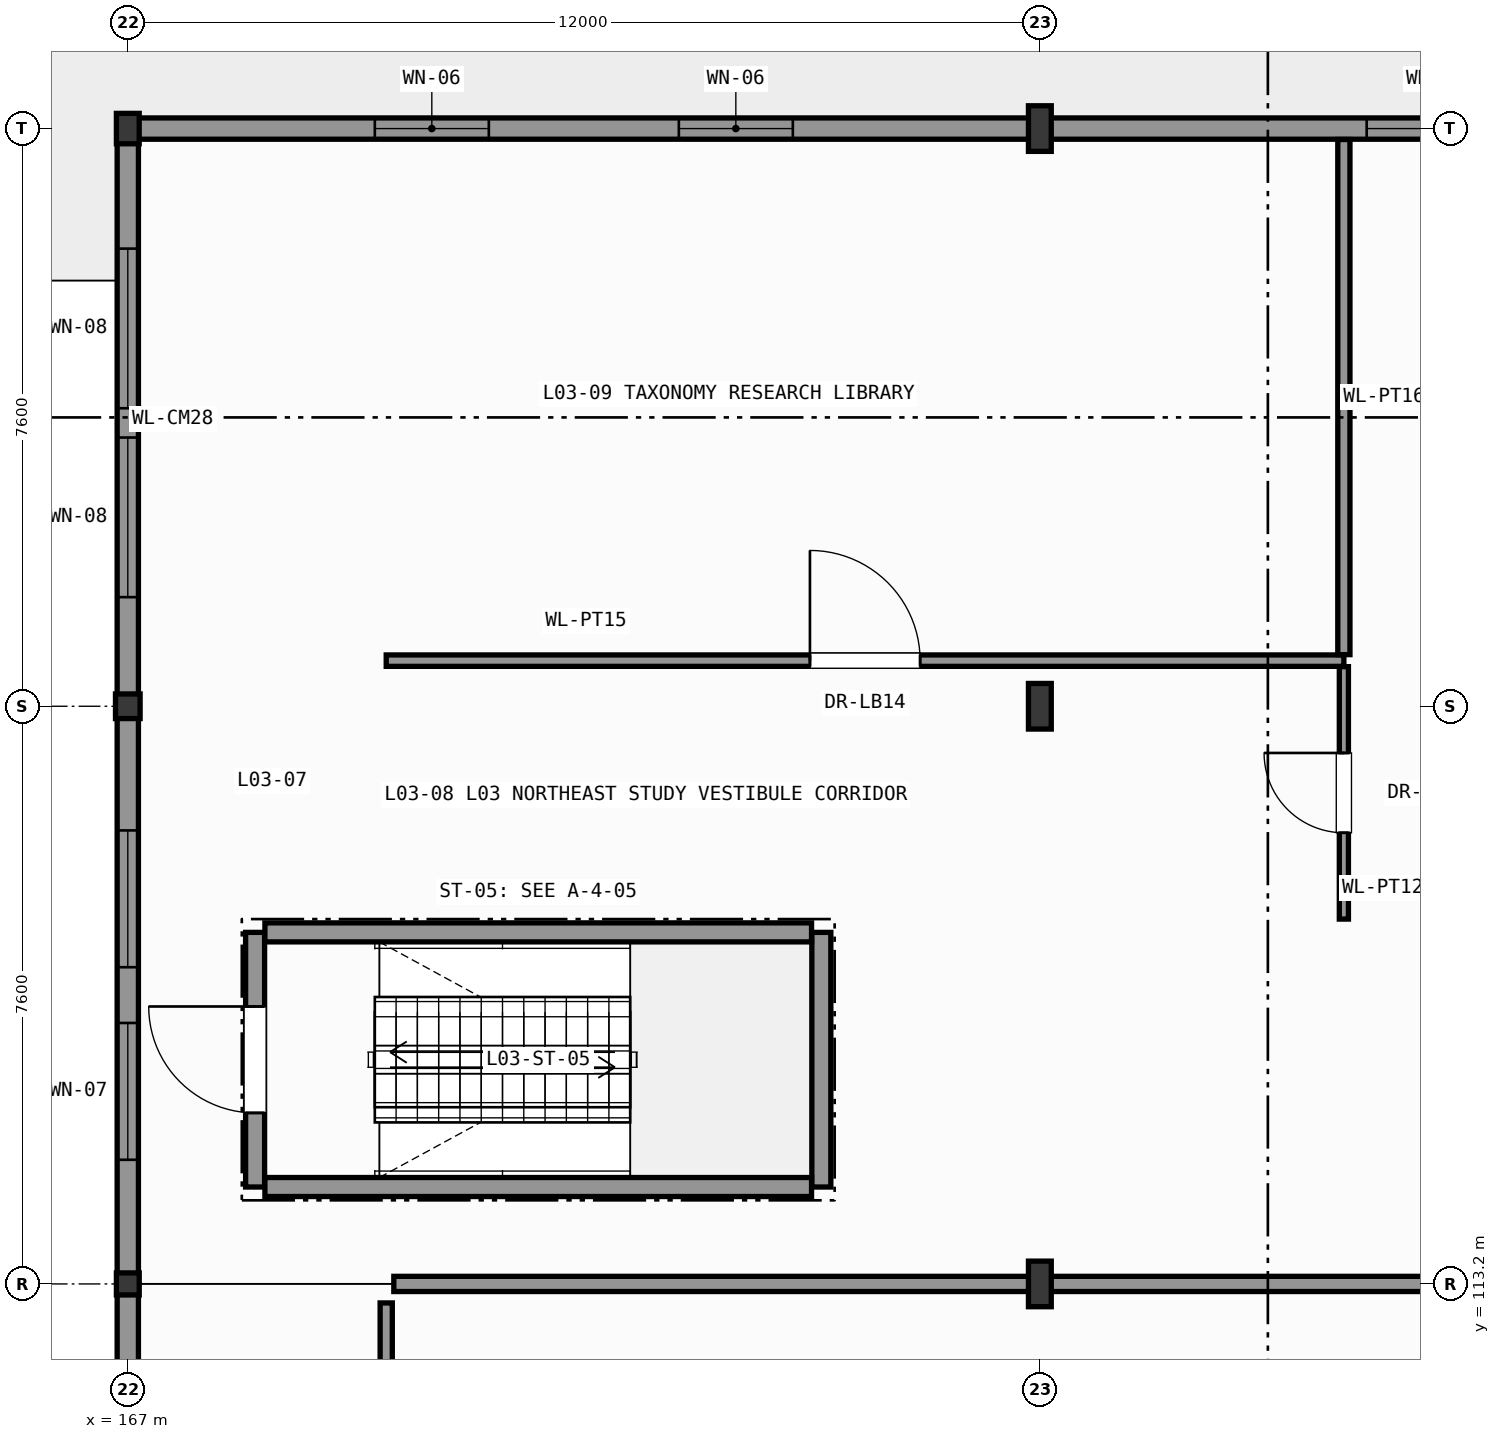
"""IFC4 building model, lengths in metres.
Left out: names, types, materials, properties, quantities, classifications, styles, units other than length and angle.
Written with IfcOpenShell. Run it as: python <this file> out.ifc"""

import sys

from ifc_helpers import new_model, si_unit, direction, frame, frame_2d, origin, origin_2d, place, context, subcontext, project, spatial, rectangle, hollow_circle, i_section, extrude, element, fill, save


model = new_model("IFC4")
c1 = context("Model", 3, precision=1e-05, world=origin(), true_north=direction((0.0, 1.0)))
c2 = subcontext(c1, "Body", "Model", "MODEL_VIEW")
j1 = project(units=[si_unit("LENGTHUNIT", "METRE"), si_unit("PLANEANGLEUNIT", "RADIAN")], contexts=[c1])
p1 = place(None, origin())
s1 = spatial("IfcSite", under=j1, at=p1, CompositionType="ELEMENT")
p2 = place(p1, origin())
s2 = spatial("IfcBuilding", under=s1, at=p2, CompositionType="ELEMENT")
p3 = place(p2, frame((0.0, 0.0, 13.2)))
s3 = spatial("IfcBuildingStorey", under=s2, at=p3, CompositionType="ELEMENT", Elevation=13.2)
p4 = place(p3, frame((167.0, 113.2, 0.0), z_axis=(0.0, 0.0, 1.0), x_axis=(1.0, 0.0, 0.0)))
e1 = element("IfcColumn", 1, at=p4, inside=s3, PredefinedType="COLUMN", context=c2, shape_type="SweptSolid", body=[
    extrude(i_section(OverallWidth=0.3, OverallDepth=0.29, WebThickness=0.009, FlangeThickness=0.014, FilletRadius=0.027, at=origin_2d()), origin(), (0.0, 0.0, 1.0), 4.8),
])
p5 = place(p3, frame((167.0, 120.8, 0.0), z_axis=(0.0, 0.0, 1.0), x_axis=(1.0, 0.0, 0.0)))
e2 = element("IfcColumn", 2, at=p5, inside=s3, PredefinedType="COLUMN", context=c2, shape_type="SweptSolid", body=[
    extrude(hollow_circle(Radius=0.162, WallThickness=0.016, at=origin_2d()), origin(), (0.0, 0.0, 1.0), 4.8),
])
p6 = place(p3, frame((167.0, 128.4, 0.0), z_axis=(0.0, 0.0, 1.0), x_axis=(1.0, 0.0, 0.0)))
e3 = element("IfcColumn", 3, at=p6, inside=s3, PredefinedType="COLUMN", context=c2, shape_type="SweptSolid", body=[
    extrude(i_section(OverallWidth=0.3, OverallDepth=0.4, WebThickness=0.013, FlangeThickness=0.024, FilletRadius=0.027, at=origin_2d()), origin(), (0.0, 0.0, 1.0), 4.8),
])
for number, where, z_axis, x_axis in (
    (4, (179.0, 113.2, 0.0), (0.0, 0.0, 1.0), (1.0, 0.0, 0.0)),
    (5, (179.0, 120.8, 0.0), (0.0, 0.0, 1.0), (1.0, 0.0, 0.0)),
    (6, (179.0, 128.4, 0.0), (0.0, 0.0, 1.0), (1.0, 0.0, 0.0)),
):
    element("IfcColumn", number, at=place(p3, frame(where, z_axis=z_axis, x_axis=x_axis)), inside=s3, PredefinedType="COLUMN", context=c2, shape_type="SweptSolid", body=[
        extrude(i_section(OverallWidth=0.3, OverallDepth=0.6, WebThickness=0.015, FlangeThickness=0.03, FilletRadius=0.027, at=origin_2d()), origin(), (0.0, 0.0, 1.0), 4.8),
    ])
p7 = place(p3, frame((179.0, 128.4, 0.0), z_axis=(0.0, 0.0, 1.0), x_axis=(1.0, 0.0, 0.0)))
e7 = element("IfcWall", 7, at=p7, inside=s3, PredefinedType="SOLIDWALL", context=c2, shape_type="SweptSolid", body=[
    extrude(rectangle(XDim=12.966, YDim=0.28, at=frame_2d((6.483, 0.0))), origin(), (0.0, 0.0, 1.0), 4.035),
])
p8 = place(p7, frame((4.3, 0.0, 0.95)))
e8 = element("IfcOpeningElement", 8, at=p8, cuts=e7, PredefinedType="OPENING", context=c2, shape_type="SweptSolid", body=[
    extrude(rectangle(XDim=1.8, YDim=2.6, at=frame_2d((0.9, 1.3))), frame((0.0, 0.15, 0.0), z_axis=(0.0, -1.0, 0.0), x_axis=(1.0, 0.0, 0.0)), (0.0, 0.0, 1.0), 0.3),
])
p9 = place(p7, frame((7.7, 0.0, 0.95)))
e9 = element("IfcOpeningElement", 9, at=p9, cuts=e7, PredefinedType="OPENING", context=c2, shape_type="SweptSolid", body=[
    extrude(rectangle(XDim=1.8, YDim=2.6, at=frame_2d((0.9, 1.3))), frame((0.0, 0.15, 0.0), z_axis=(0.0, -1.0, 0.0), x_axis=(1.0, 0.0, 0.0)), (0.0, 0.0, 1.0), 0.3),
])
p10 = place(p3, frame((167.0, 128.4, 0.0), z_axis=(0.0, 0.0, 1.0), x_axis=(1.0, 0.0, 0.0)))
e10 = element("IfcWall", 10, at=p10, inside=s3, PredefinedType="SOLIDWALL", context=c2, shape_type="SweptSolid", body=[
    extrude(rectangle(XDim=12.0, YDim=0.28, at=frame_2d((6.0, 0.0))), origin(), (0.0, 0.0, 1.0), 4.035),
])
p11 = place(p10, frame((3.25, 0.0, 0.95)))
e11 = element("IfcOpeningElement", 11, at=p11, cuts=e10, PredefinedType="OPENING", context=c2, shape_type="SweptSolid", body=[
    extrude(rectangle(XDim=1.5, YDim=2.4, at=frame_2d((0.75, 1.2))), frame((0.0, 0.15, 0.0), z_axis=(0.0, -1.0, 0.0), x_axis=(1.0, 0.0, 0.0)), (0.0, 0.0, 1.0), 0.3),
])
p12 = place(p10, frame((7.25, 0.0, 0.95)))
e12 = element("IfcOpeningElement", 12, at=p12, cuts=e10, PredefinedType="OPENING", context=c2, shape_type="SweptSolid", body=[
    extrude(rectangle(XDim=1.5, YDim=2.4, at=frame_2d((0.75, 1.2))), frame((0.0, 0.15, 0.0), z_axis=(0.0, -1.0, 0.0), x_axis=(1.0, 0.0, 0.0)), (0.0, 0.0, 1.0), 0.3),
])
p13 = place(p3, frame((167.0, 120.8, 0.0), z_axis=(0.0, 0.0, 1.0), x_axis=(0.0, 1.0, 0.0)))
e13 = element("IfcWall", 13, at=p13, inside=s3, PredefinedType="SOLIDWALL", context=c2, shape_type="SweptSolid", body=[
    extrude(rectangle(XDim=7.456, YDim=0.28, at=frame_2d((3.728, 0.0))), origin(), (0.0, 0.0, 1.0), 4.215),
])
p14 = place(p13, frame((1.435, 0.0, 0.95)))
e14 = element("IfcOpeningElement", 14, at=p14, cuts=e13, PredefinedType="OPENING", context=c2, shape_type="SweptSolid", body=[
    extrude(rectangle(XDim=2.1, YDim=2.8, at=frame_2d((1.05, 1.4))), frame((0.0, 0.15, 0.0), z_axis=(0.0, -1.0, 0.0), x_axis=(1.0, 0.0, 0.0)), (0.0, 0.0, 1.0), 0.3),
])
p15 = place(p13, frame((3.921, 0.0, 0.95)))
e15 = element("IfcOpeningElement", 15, at=p15, cuts=e13, PredefinedType="OPENING", context=c2, shape_type="SweptSolid", body=[
    extrude(rectangle(XDim=2.1, YDim=2.8, at=frame_2d((1.05, 1.4))), frame((0.0, 0.15, 0.0), z_axis=(0.0, -1.0, 0.0), x_axis=(1.0, 0.0, 0.0)), (0.0, 0.0, 1.0), 0.3),
])
p16 = place(p3, frame((167.0, 113.2, 0.0), z_axis=(0.0, 0.0, 1.0), x_axis=(0.0, 1.0, 0.0)))
e16 = element("IfcWall", 16, at=p16, inside=s3, PredefinedType="SOLIDWALL", context=c2, shape_type="SweptSolid", body=[
    extrude(rectangle(XDim=7.6, YDim=0.28, at=frame_2d((3.8, 0.0))), origin(), (0.0, 0.0, 1.0), 4.215),
])
p17 = place(p16, frame((1.633, 0.0, 0.95)))
e17 = element("IfcOpeningElement", 17, at=p17, cuts=e16, PredefinedType="OPENING", context=c2, shape_type="SweptSolid", body=[
    extrude(rectangle(XDim=1.8, YDim=2.6, at=frame_2d((0.9, 1.3))), frame((0.0, 0.15, 0.0), z_axis=(0.0, -1.0, 0.0), x_axis=(1.0, 0.0, 0.0)), (0.0, 0.0, 1.0), 0.3),
])
p18 = place(p16, frame((4.167, 0.0, 0.95)))
e18 = element("IfcOpeningElement", 18, at=p18, cuts=e16, PredefinedType="OPENING", context=c2, shape_type="SweptSolid", body=[
    extrude(rectangle(XDim=1.8, YDim=2.6, at=frame_2d((0.9, 1.3))), frame((0.0, 0.15, 0.0), z_axis=(0.0, -1.0, 0.0), x_axis=(1.0, 0.0, 0.0)), (0.0, 0.0, 1.0), 0.3),
])
p19 = place(p3, frame((167.0, 105.6, 0.0), z_axis=(0.0, 0.0, 1.0), x_axis=(0.0, 1.0, 0.0)))
e19 = element("IfcWall", 19, at=p19, inside=s3, PredefinedType="SOLIDWALL", context=c2, shape_type="SweptSolid", body=[
    extrude(rectangle(XDim=7.6, YDim=0.28, at=frame_2d((3.8, 0.0))), origin(), (0.0, 0.0, 1.0), 4.215),
])
p20 = place(p19, frame((1.783, 0.0, 0.95)))
e20 = element("IfcOpeningElement", 20, at=p20, cuts=e19, PredefinedType="OPENING", context=c2, shape_type="SweptSolid", body=[
    extrude(rectangle(XDim=1.5, YDim=2.4, at=frame_2d((0.75, 1.2))), frame((0.0, 0.15, 0.0), z_axis=(0.0, -1.0, 0.0), x_axis=(1.0, 0.0, 0.0)), (0.0, 0.0, 1.0), 0.3),
])
p21 = place(p19, frame((4.317, 0.0, 0.95)))
e21 = element("IfcOpeningElement", 21, at=p21, cuts=e19, PredefinedType="OPENING", context=c2, shape_type="SweptSolid", body=[
    extrude(rectangle(XDim=1.5, YDim=2.4, at=frame_2d((0.75, 1.2))), frame((0.0, 0.15, 0.0), z_axis=(0.0, -1.0, 0.0), x_axis=(1.0, 0.0, 0.0)), (0.0, 0.0, 1.0), 0.3),
])
p22 = place(p3, frame((168.675, 114.475, 0.0), z_axis=(0.0, 0.0, 1.0), x_axis=(0.0, 1.0, 0.0)))
e22 = element("IfcWall", 22, at=p22, inside=s3, PredefinedType="SHEAR", context=c2, shape_type="SweptSolid", body=[
    extrude(rectangle(XDim=3.35, YDim=0.25, at=frame_2d((1.675, 0.0))), origin(), (0.0, 0.0, 1.0), 4.56),
])
p23 = place(p22, frame((0.975, 0.0, 0.0)))
e23 = element("IfcOpeningElement", 23, at=p23, cuts=e22, PredefinedType="OPENING", context=c2, shape_type="SweptSolid", body=[
    extrude(rectangle(XDim=1.4, YDim=2.2, at=frame_2d((0.7, 1.1))), frame((0.0, 0.135, 0.0), z_axis=(0.0, -1.0, 0.0), x_axis=(1.0, 0.0, 0.0)), (0.0, 0.0, 1.0), 0.27),
])
p24 = place(p3, frame((176.125, 114.475, 0.0), z_axis=(0.0, 0.0, 1.0), x_axis=(0.0, 1.0, 0.0)))
e24 = element("IfcWall", 24, at=p24, inside=s3, PredefinedType="SHEAR", context=c2, shape_type="SweptSolid", body=[
    extrude(rectangle(XDim=3.35, YDim=0.25, at=frame_2d((1.675, 0.0))), origin(), (0.0, 0.0, 1.0), 4.56),
])
for number, where, z_axis, x_axis in (
    (25, (168.804, 114.475, 0.0), (0.0, 0.0, 1.0), (1.0, 0.0, 0.0)),
    (26, (168.804, 117.825, 0.0), (0.0, 0.0, 1.0), (1.0, 0.0, 0.0)),
):
    element("IfcWall", number, at=place(p3, frame(where, z_axis=z_axis, x_axis=x_axis)), inside=s3, PredefinedType="SHEAR", context=c2, shape_type="SweptSolid", body=[
        extrude(rectangle(XDim=7.192, YDim=0.25, at=frame_2d((3.596, 0.0))), origin(), (0.0, 0.0, 1.0), 4.56),
    ])
p25 = place(p3, frame((170.4, 121.4, 0.0), z_axis=(0.0, 0.0, 1.0), x_axis=(1.0, 0.0, 0.0)))
e27 = element("IfcWall", 27, at=p25, inside=s3, PredefinedType="PARTITIONING", context=c2, shape_type="SweptSolid", body=[
    extrude(rectangle(XDim=12.6, YDim=0.15, at=frame_2d((6.3, 0.0))), origin(), (0.0, 0.0, 1.0), 4.56),
])
p26 = place(p25, frame((5.575, 0.0, 0.0)))
e28 = element("IfcOpeningElement", 28, at=p26, cuts=e27, PredefinedType="OPENING", context=c2, shape_type="SweptSolid", body=[
    extrude(rectangle(XDim=1.45, YDim=2.35, at=frame_2d((0.725, 1.175))), frame((0.0, 0.085, 0.0), z_axis=(0.0, -1.0, 0.0), x_axis=(1.0, 0.0, 0.0)), (0.0, 0.0, 1.0), 0.17),
])
p27 = place(p3, frame((183.0, 118.0, 0.0), z_axis=(0.0, 0.0, 1.0), x_axis=(0.0, 1.0, 0.0)))
e29 = element("IfcWall", 29, at=p27, inside=s3, PredefinedType="PARTITIONING", context=c2, shape_type="SweptSolid", body=[
    extrude(rectangle(XDim=3.321, YDim=0.12, at=frame_2d((1.661, 0.0))), origin(), (0.0, 0.0, 1.0), 4.56),
])
p28 = place(p27, frame((1.135, 0.0, 0.0)))
e30 = element("IfcOpeningElement", 30, at=p28, cuts=e29, PredefinedType="OPENING", context=c2, shape_type="SweptSolid", body=[
    extrude(rectangle(XDim=1.05, YDim=2.2, at=frame_2d((0.525, 1.1))), frame((0.0, 0.07, 0.0), z_axis=(0.0, -1.0, 0.0), x_axis=(1.0, 0.0, 0.0)), (0.0, 0.0, 1.0), 0.14),
])
p29 = place(p3, frame((183.0, 121.479, 0.0), z_axis=(0.0, 0.0, 1.0), x_axis=(0.0, 1.0, 0.0)))
e31 = element("IfcWall", 31, at=p29, inside=s3, PredefinedType="PARTITIONING", context=c2, shape_type="SweptSolid", body=[
    extrude(rectangle(XDim=6.777, YDim=0.16, at=frame_2d((3.389, 0.0))), origin(), (0.0, 0.0, 1.0), 4.56),
])
p30 = place(p3, frame((170.4, 86.864, 0.0), z_axis=(0.0, 0.0, 1.0), x_axis=(0.0, 1.0, 0.0)))
e32 = element("IfcWall", 32, at=p30, inside=s3, PredefinedType="PARTITIONING", context=c2, shape_type="SweptSolid", body=[
    extrude(rectangle(XDim=26.086, YDim=0.16, at=frame_2d((13.043, 0.0))), origin(), (0.0, 0.0, 1.0), 4.56),
])
p31 = place(p30, frame((12.518, 0.0, 0.0)))
e33 = element("IfcOpeningElement", 33, at=p31, cuts=e32, PredefinedType="OPENING", context=c2, shape_type="SweptSolid", body=[
    extrude(rectangle(XDim=1.05, YDim=2.2, at=frame_2d((0.525, 1.1))), frame((0.0, 0.09, 0.0), z_axis=(0.0, -1.0, 0.0), x_axis=(1.0, 0.0, 0.0)), (0.0, 0.0, 1.0), 0.18),
])
p32 = place(p3, frame((170.5, 113.2, 0.0), z_axis=(0.0, 0.0, 1.0), x_axis=(1.0, 0.0, 0.0)))
e34 = element("IfcWall", 34, at=p32, inside=s3, PredefinedType="PARTITIONING", context=c2, shape_type="SweptSolid", body=[
    extrude(rectangle(XDim=27.3, YDim=0.2, at=frame_2d((13.65, 0.0))), origin(), (0.0, 0.0, 1.0), 3.805),
])
p33 = place(p8, origin())
e35 = element("IfcWindow", 35, at=p33, inside=s3, PartitioningType="SINGLE_PANEL", PredefinedType="WINDOW", context=c2, shape_type="SweptSolid", body=[
    extrude(rectangle(XDim=1.8, YDim=2.6, at=frame_2d((0.9, 1.3))), frame((0.0, 0.03, 0.0), z_axis=(0.0, -1.0, 0.0), x_axis=(1.0, 0.0, 0.0)), (0.0, 0.0, 1.0), 0.06),
])
fill(e8, e35)
p34 = place(p11, origin())
e36 = element("IfcWindow", 36, at=p34, inside=s3, PartitioningType="SINGLE_PANEL", PredefinedType="WINDOW", context=c2, shape_type="SweptSolid", body=[
    extrude(rectangle(XDim=1.5, YDim=2.4, at=frame_2d((0.75, 1.2))), frame((0.0, 0.03, 0.0), z_axis=(0.0, -1.0, 0.0), x_axis=(1.0, 0.0, 0.0)), (0.0, 0.0, 1.0), 0.06),
])
fill(e11, e36)
p35 = place(p12, origin())
e37 = element("IfcWindow", 37, at=p35, inside=s3, PartitioningType="SINGLE_PANEL", PredefinedType="WINDOW", context=c2, shape_type="SweptSolid", body=[
    extrude(rectangle(XDim=1.5, YDim=2.4, at=frame_2d((0.75, 1.2))), frame((0.0, 0.03, 0.0), z_axis=(0.0, -1.0, 0.0), x_axis=(1.0, 0.0, 0.0)), (0.0, 0.0, 1.0), 0.06),
])
fill(e12, e37)
p36 = place(p14, origin())
e38 = element("IfcWindow", 38, at=p36, inside=s3, PartitioningType="SINGLE_PANEL", PredefinedType="WINDOW", context=c2, shape_type="SweptSolid", body=[
    extrude(rectangle(XDim=2.1, YDim=2.8, at=frame_2d((1.05, 1.4))), frame((0.0, 0.03, 0.0), z_axis=(0.0, -1.0, 0.0), x_axis=(1.0, 0.0, 0.0)), (0.0, 0.0, 1.0), 0.06),
])
fill(e14, e38)
p37 = place(p15, origin())
e39 = element("IfcWindow", 39, at=p37, inside=s3, PartitioningType="SINGLE_PANEL", PredefinedType="WINDOW", context=c2, shape_type="SweptSolid", body=[
    extrude(rectangle(XDim=2.1, YDim=2.8, at=frame_2d((1.05, 1.4))), frame((0.0, 0.03, 0.0), z_axis=(0.0, -1.0, 0.0), x_axis=(1.0, 0.0, 0.0)), (0.0, 0.0, 1.0), 0.06),
])
fill(e15, e39)
p38 = place(p17, origin())
e40 = element("IfcWindow", 40, at=p38, inside=s3, PartitioningType="SINGLE_PANEL", PredefinedType="WINDOW", context=c2, shape_type="SweptSolid", body=[
    extrude(rectangle(XDim=1.8, YDim=2.6, at=frame_2d((0.9, 1.3))), frame((0.0, 0.03, 0.0), z_axis=(0.0, -1.0, 0.0), x_axis=(1.0, 0.0, 0.0)), (0.0, 0.0, 1.0), 0.06),
])
fill(e17, e40)
p39 = place(p18, origin())
e41 = element("IfcWindow", 41, at=p39, inside=s3, PartitioningType="SINGLE_PANEL", PredefinedType="WINDOW", context=c2, shape_type="SweptSolid", body=[
    extrude(rectangle(XDim=1.8, YDim=2.6, at=frame_2d((0.9, 1.3))), frame((0.0, 0.03, 0.0), z_axis=(0.0, -1.0, 0.0), x_axis=(1.0, 0.0, 0.0)), (0.0, 0.0, 1.0), 0.06),
])
fill(e18, e41)
p40 = place(p23, origin())
e42 = element("IfcDoor", 42, at=p40, inside=s3, OperationType="SINGLE_SWING_RIGHT", PredefinedType="DOOR", context=c2, shape_type="SweptSolid", body=[
    extrude(rectangle(XDim=1.4, YDim=2.2, at=frame_2d((0.7, 1.1))), frame((0.0, 0.025, 0.0), z_axis=(0.0, -1.0, 0.0), x_axis=(1.0, 0.0, 0.0)), (0.0, 0.0, 1.0), 0.05),
])
fill(e23, e42)
p41 = place(p26, origin())
e43 = element("IfcDoor", 43, at=p41, inside=s3, OperationType="SINGLE_SWING_LEFT", PredefinedType="DOOR", context=c2, shape_type="SweptSolid", body=[
    extrude(rectangle(XDim=1.45, YDim=2.35, at=frame_2d((0.725, 1.175))), frame((0.0, 0.025, 0.0), z_axis=(0.0, -1.0, 0.0), x_axis=(1.0, 0.0, 0.0)), (0.0, 0.0, 1.0), 0.05),
])
fill(e28, e43)
p42 = place(p28, origin())
e44 = element("IfcDoor", 44, at=p42, inside=s3, OperationType="SINGLE_SWING_RIGHT", PredefinedType="DOOR", context=c2, shape_type="SweptSolid", body=[
    extrude(rectangle(XDim=1.05, YDim=2.2, at=frame_2d((0.525, 1.1))), frame((0.0, 0.025, 0.0), z_axis=(0.0, -1.0, 0.0), x_axis=(1.0, 0.0, 0.0)), (0.0, 0.0, 1.0), 0.05),
])
fill(e30, e44)
save(model, sys.argv[1])
